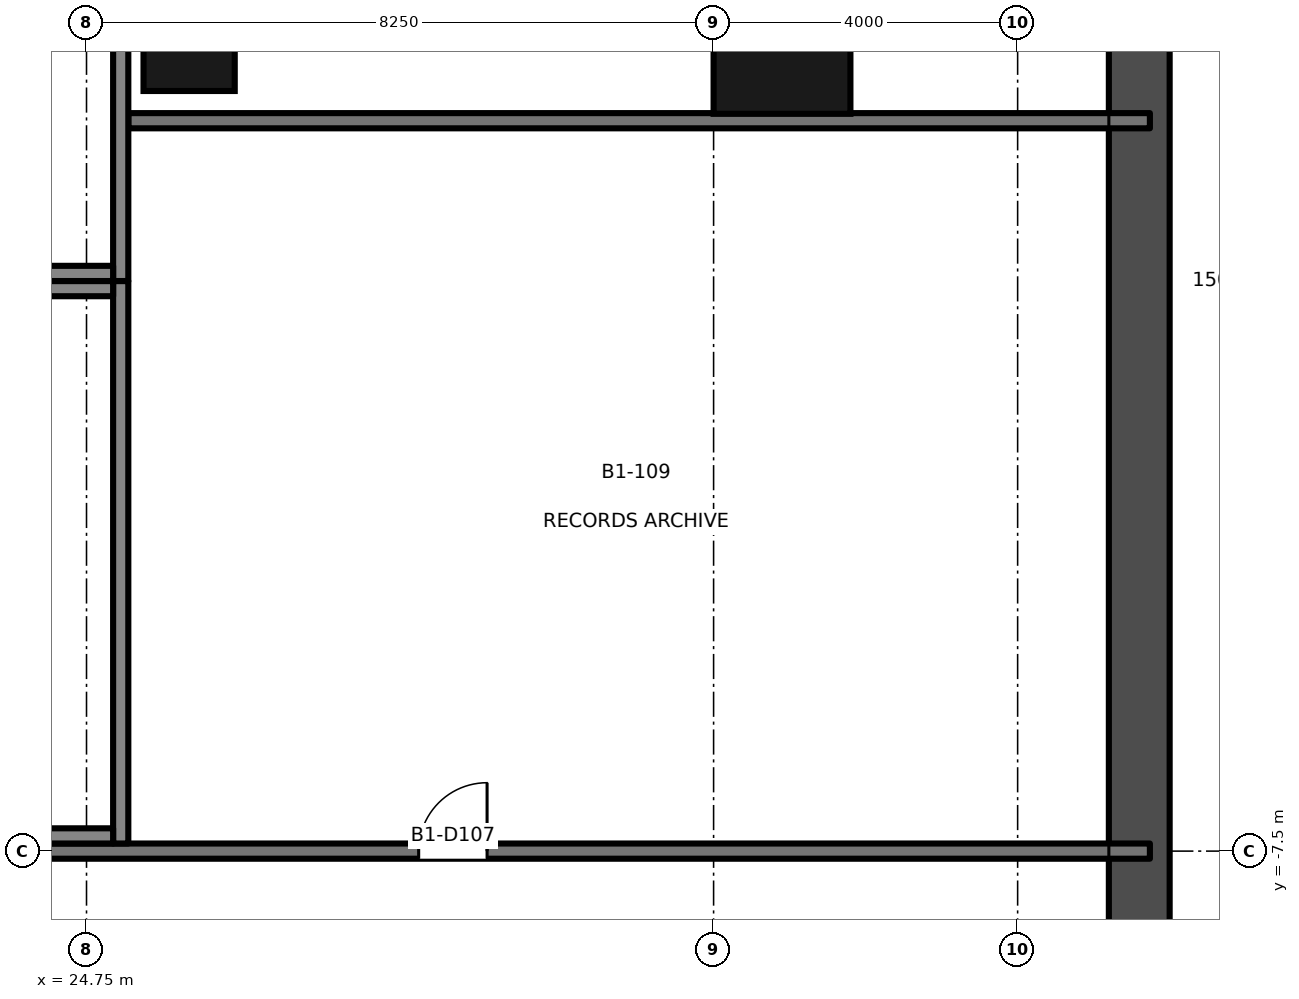
"""IFC4 building model, lengths in metres.
Left out: names, types, materials, properties, quantities, classifications, styles, units other than length and angle.
Written with IfcOpenShell. Run it as: python <this file> out.ifc"""

import sys

from ifc_helpers import new_model, si_unit, direction, frame, frame_2d, origin, origin_2d, place, context, subcontext, project, spatial, rectangle, extrude, element, fill, save


model = new_model("IFC4")
c1 = context("Model", 3, precision=1e-05, world=origin(), true_north=direction((0.0, 1.0)))
c2 = subcontext(c1, "Body", "Model", "MODEL_VIEW")
j1 = project(units=[si_unit("LENGTHUNIT", "METRE"), si_unit("PLANEANGLEUNIT", "RADIAN")], contexts=[c1])
p1 = place(None, origin())
s1 = spatial("IfcSite", under=j1, at=p1, CompositionType="ELEMENT")
p2 = place(p1, origin())
s2 = spatial("IfcBuilding", under=s1, at=p2, CompositionType="ELEMENT")
p3 = place(p2, frame((0.0, 0.0, -5.5)))
s3 = spatial("IfcBuildingStorey", under=s2, at=p3, CompositionType="ELEMENT", Elevation=-5.5)
p4 = place(p3, frame((38.6, -38.7, -0.2), z_axis=(0.0, 0.0, 1.0), x_axis=(0.0, 1.0, 0.0)))
e1 = element("IfcWall", 1, at=p4, inside=s3, PredefinedType="SOLIDWALL", context=c2, shape_type="SweptSolid", body=[
    extrude(rectangle(XDim=51.9, YDim=0.8, at=frame_2d((25.95, 0.0))), origin(), (0.0, 0.0, 1.0), 5.5),
])
p5 = place(p3, frame((33.9, 3.1, -0.2), z_axis=(0.0, 0.0, 1.0), x_axis=(0.0, 1.0, 0.0)))
e2 = element("IfcColumn", 2, at=p5, inside=s3, PredefinedType="COLUMN", context=c2, shape_type="SweptSolid", body=[
    extrude(rectangle(XDim=1.8, YDim=1.8, at=origin_2d()), origin(), (0.0, 0.0, 1.0), 5.5),
])
p6 = place(p3, frame((26.1, 3.1, -0.2), z_axis=(0.0, 0.0, 1.0), x_axis=(1.0, 0.0, 0.0)))
e3 = element("IfcColumn", 3, at=p6, inside=s3, PredefinedType="COLUMN", context=c2, shape_type="SweptSolid", body=[
    extrude(rectangle(XDim=1.2, YDim=1.2, at=origin_2d()), origin(), (0.0, 0.0, 1.0), 5.5),
])
p7 = place(p3, frame((25.2, -7.4, -0.2), z_axis=(0.0, 0.0, 1.0), x_axis=(0.0, 1.0, 0.0)))
e4 = element("IfcWall", 4, at=p7, inside=s3, PredefinedType="SHEAR", context=c2, shape_type="SweptSolid", body=[
    extrude(rectangle(XDim=7.4, YDim=0.2, at=frame_2d((3.7, 0.0))), origin(), (0.0, 0.0, 1.0), 5.5),
])
for number, where, z_axis, x_axis in (
    (5, (20.6, -0.1, -0.2), (0.0, 0.0, 1.0), (1.0, 0.0, 0.0)),
    (6, (20.6, -7.3, -0.2), (0.0, 0.0, 1.0), (1.0, 0.0, 0.0)),
):
    element("IfcWall", number, at=place(p3, frame(where, z_axis=z_axis, x_axis=x_axis)), inside=s3, PredefinedType="SHEAR", context=c2, shape_type="SweptSolid", body=[
        extrude(rectangle(XDim=4.5, YDim=0.2, at=frame_2d((2.25, 0.0))), origin(), (0.0, 0.0, 1.0), 5.5),
    ])
p8 = place(p3, frame((25.2, 0.0, -0.2), z_axis=(0.0, 0.0, 1.0), x_axis=(0.0, 1.0, 0.0)))
e7 = element("IfcWall", 7, at=p8, inside=s3, PredefinedType="SHEAR", context=c2, shape_type="SweptSolid", body=[
    extrude(rectangle(XDim=7.4, YDim=0.2, at=frame_2d((3.7, 0.0))), origin(), (0.0, 0.0, 1.0), 5.5),
])
p9 = place(p3, frame((20.6, 0.1, -0.2), z_axis=(0.0, 0.0, 1.0), x_axis=(1.0, 0.0, 0.0)))
e8 = element("IfcWall", 8, at=p9, inside=s3, PredefinedType="SHEAR", context=c2, shape_type="SweptSolid", body=[
    extrude(rectangle(XDim=4.5, YDim=0.2, at=frame_2d((2.25, 0.0))), origin(), (0.0, 0.0, 1.0), 5.5),
])
p10 = place(p3, frame((20.4, -7.5, 0.0), z_axis=(0.0, 0.0, 1.0), x_axis=(1.0, 0.0, 0.0)))
e9 = element("IfcWall", 9, at=p10, inside=s3, PredefinedType="PARTITIONING", context=c2, shape_type="SweptSolid", body=[
    extrude(rectangle(XDim=18.34, YDim=0.2, at=frame_2d((9.17, 0.0))), origin(), (0.0, 0.0, 1.0), 4.1),
])
p11 = place(p10, frame((8.72, 0.0, 0.0)))
e10 = element("IfcOpeningElement", 10, at=p11, cuts=e9, PredefinedType="OPENING", context=c2, shape_type="SweptSolid", body=[
    extrude(rectangle(XDim=0.9, YDim=2.1, at=frame_2d((0.45, 1.05))), frame((0.0, 0.111, 0.0), z_axis=(0.0, -1.0, 0.0), x_axis=(1.0, 0.0, 0.0)), (0.0, 0.0, 1.0), 0.221),
])
p12 = place(p3, frame((25.3, 2.109, 0.0), z_axis=(0.0, 0.0, 1.0), x_axis=(1.0, 0.0, 0.0)))
e11 = element("IfcWall", 11, at=p12, inside=s3, PredefinedType="PARTITIONING", context=c2, shape_type="SweptSolid", body=[
    extrude(rectangle(XDim=13.44, YDim=0.2, at=frame_2d((6.72, 0.0))), origin(), (0.0, 0.0, 1.0), 4.1),
])
p13 = place(p11, origin())
e12 = element("IfcDoor", 12, at=p13, inside=s3, OperationType="SINGLE_SWING_RIGHT", PredefinedType="DOOR", context=c2, shape_type="SweptSolid", body=[
    extrude(rectangle(XDim=0.9, YDim=2.1, at=frame_2d((0.45, 1.05))), frame((0.0, 0.025, 0.0), z_axis=(0.0, -1.0, 0.0), x_axis=(1.0, 0.0, 0.0)), (0.0, 0.0, 1.0), 0.05),
])
fill(e10, e12)
save(model, sys.argv[1])
